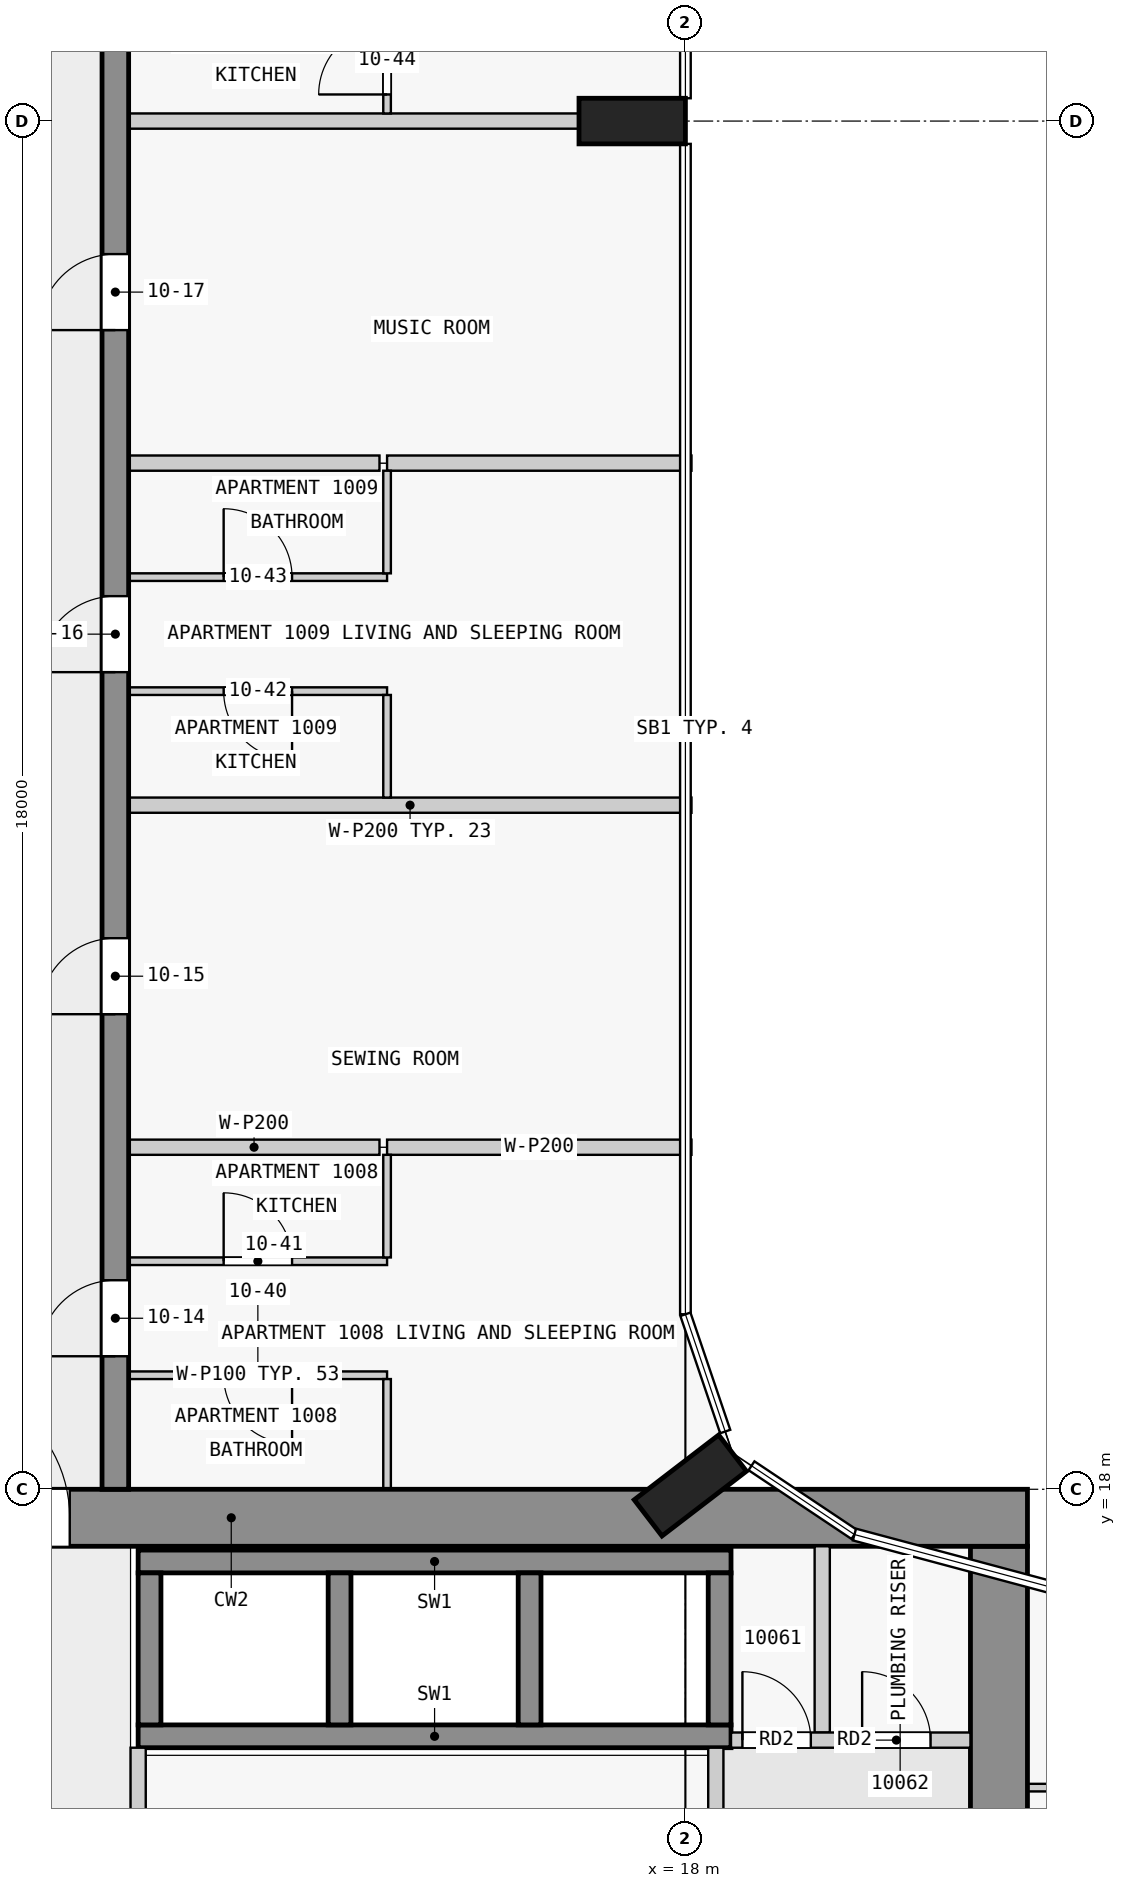
"""IFC4 building model, lengths in metres.
Left out: names, types, materials, properties, quantities, classifications, styles, units other than length and angle.
Written with IfcOpenShell. Run it as: python <this file> out.ifc"""

import sys

from ifc_helpers import new_model, si_unit, direction, frame, frame_2d, origin, origin_2d, place, context, subcontext, project, spatial, rectangle, extrude, element, fill, save


model = new_model("IFC4")
c1 = context("Model", 3, precision=1e-05, world=origin(), true_north=direction((0.0, 1.0)))
c2 = subcontext(c1, "Body", "Model", "MODEL_VIEW")
j1 = project(units=[si_unit("LENGTHUNIT", "METRE"), si_unit("PLANEANGLEUNIT", "RADIAN")], contexts=[c1])
p1 = place(None, origin())
s1 = spatial("IfcSite", under=j1, at=p1, CompositionType="ELEMENT")
p2 = place(p1, origin())
s2 = spatial("IfcBuilding", under=s1, at=p2, CompositionType="ELEMENT")
p3 = place(p2, frame((0.0, 0.0, 44.3)))
s3 = spatial("IfcBuildingStorey", under=s2, at=p3, CompositionType="ELEMENT", Elevation=44.3)
for number, where, z_axis, x_axis in (
    (1, (18.065, 18.05, 0.0), (0.0, 0.0, 1.0), (-0.609, 0.793, 0.0)),
    (2, (17.3, 36.0, 0.0), (0.0, 0.0, 1.0), (0.0, 1.0, 0.0)),
):
    element("IfcColumn", number, at=place(p3, frame(where, z_axis=z_axis, x_axis=x_axis)), inside=s3, PredefinedType="COLUMN", context=c2, shape_type="SweptSolid", body=[
        extrude(rectangle(XDim=0.6, YDim=1.4, at=origin_2d()), origin(), (0.0, 0.0, 1.0), 3.5),
    ])
p4 = place(p3, frame((1.55, 17.625, 0.0), z_axis=(0.0, 0.0, 1.0), x_axis=(1.0, 0.0, 0.0)))
e3 = element("IfcWall", 3, at=p4, inside=s3, PredefinedType="SHEAR", context=c2, shape_type="SweptSolid", body=[
    extrude(rectangle(XDim=20.95, YDim=0.75, at=frame_2d((10.475, 0.0))), origin(), (0.0, 0.0, 1.0), 3.25),
])
p5 = place(p4, frame((6.55, 0.0, 0.0)))
e4 = element("IfcOpeningElement", 4, at=p5, cuts=e3, PredefinedType="OPENING", context=c2, shape_type="SweptSolid", body=[
    extrude(rectangle(XDim=1.8, YDim=2.1, at=frame_2d((0.9, 1.05))), frame((0.0, 0.385, 0.0), z_axis=(0.0, -1.0, 0.0), x_axis=(1.0, 0.0, 0.0)), (0.0, 0.0, 1.0), 0.77),
])
p6 = place(p3, frame((22.125, 2.5, 0.0), z_axis=(0.0, 0.0, 1.0), x_axis=(0.0, 1.0, 0.0)))
e5 = element("IfcWall", 5, at=p6, inside=s3, PredefinedType="SHEAR", context=c2, shape_type="SweptSolid", body=[
    extrude(rectangle(XDim=14.75, YDim=0.75, at=frame_2d((7.375, 0.0))), origin(), (0.0, 0.0, 1.0), 3.25),
])
p7 = place(p6, frame((5.6, 0.0, 0.0)))
e6 = element("IfcOpeningElement", 6, at=p7, cuts=e5, PredefinedType="OPENING", context=c2, shape_type="SweptSolid", body=[
    extrude(rectangle(XDim=1.8, YDim=2.1, at=frame_2d((0.9, 1.05))), frame((0.0, 0.385, 0.0), z_axis=(0.0, -1.0, 0.0), x_axis=(1.0, 0.0, 0.0)), (0.0, 0.0, 1.0), 0.77),
])
for number, where, z_axis, x_axis in (
    (7, (10.8, 17.05, 0.0), (0.0, 0.0, 1.0), (1.0, 0.0, 0.0)),
    (8, (10.8, 14.75, 0.0), (0.0, 0.0, 1.0), (1.0, 0.0, 0.0)),
):
    element("IfcWall", number, at=place(p3, frame(where, z_axis=z_axis, x_axis=x_axis)), inside=s3, PredefinedType="SHEAR", context=c2, shape_type="SweptSolid", body=[
        extrude(rectangle(XDim=7.8, YDim=0.3, at=frame_2d((3.9, 0.0))), origin(), (0.0, 0.0, 1.0), 3.25),
    ])
for number, where, z_axis, x_axis in (
    (9, (10.95, 14.9, 0.0), (0.0, 0.0, 1.0), (0.0, 1.0, 0.0)),
    (10, (13.45, 14.9, 0.0), (0.0, 0.0, 1.0), (0.0, 1.0, 0.0)),
    (11, (15.95, 14.9, 0.0), (0.0, 0.0, 1.0), (0.0, 1.0, 0.0)),
    (12, (18.45, 14.9, 0.0), (0.0, 0.0, 1.0), (0.0, 1.0, 0.0)),
):
    element("IfcWall", number, at=place(p3, frame(where, z_axis=z_axis, x_axis=x_axis)), inside=s3, PredefinedType="SHEAR", context=c2, shape_type="SweptSolid", body=[
        extrude(rectangle(XDim=2.0, YDim=0.3, at=frame_2d((1.0, 0.0))), origin(), (0.0, 0.0, 1.0), 3.25),
    ])
p8 = place(p3, frame((10.5, 18.0, 0.0), z_axis=(0.0, 0.0, 1.0), x_axis=(0.0, 1.0, 0.0)))
e13 = element("IfcWall", 13, at=p8, inside=s3, PredefinedType="SHEAR", context=c2, shape_type="SweptSolid", body=[
    extrude(rectangle(XDim=27.0, YDim=0.35, at=frame_2d((13.5, 0.0))), origin(), (0.0, 0.0, 1.0), 3.25),
])
p9 = place(p8, frame((1.75, 0.0, 0.0)))
e14 = element("IfcOpeningElement", 14, at=p9, cuts=e13, PredefinedType="OPENING", context=c2, shape_type="SweptSolid", body=[
    extrude(rectangle(XDim=1.0, YDim=2.1, at=frame_2d((0.5, 1.05))), frame((0.0, 0.185, 0.0), z_axis=(0.0, -1.0, 0.0), x_axis=(1.0, 0.0, 0.0)), (0.0, 0.0, 1.0), 0.37),
])
p10 = place(p8, frame((6.25, 0.0, 0.0)))
e15 = element("IfcOpeningElement", 15, at=p10, cuts=e13, PredefinedType="OPENING", context=c2, shape_type="SweptSolid", body=[
    extrude(rectangle(XDim=1.0, YDim=2.1, at=frame_2d((0.5, 1.05))), frame((0.0, 0.185, 0.0), z_axis=(0.0, -1.0, 0.0), x_axis=(1.0, 0.0, 0.0)), (0.0, 0.0, 1.0), 0.37),
])
p11 = place(p8, frame((10.75, 0.0, 0.0)))
e16 = element("IfcOpeningElement", 16, at=p11, cuts=e13, PredefinedType="OPENING", context=c2, shape_type="SweptSolid", body=[
    extrude(rectangle(XDim=1.0, YDim=2.1, at=frame_2d((0.5, 1.05))), frame((0.0, 0.185, 0.0), z_axis=(0.0, -1.0, 0.0), x_axis=(1.0, 0.0, 0.0)), (0.0, 0.0, 1.0), 0.37),
])
p12 = place(p8, frame((15.25, 0.0, 0.0)))
e17 = element("IfcOpeningElement", 17, at=p12, cuts=e13, PredefinedType="OPENING", context=c2, shape_type="SweptSolid", body=[
    extrude(rectangle(XDim=1.0, YDim=2.1, at=frame_2d((0.5, 1.05))), frame((0.0, 0.185, 0.0), z_axis=(0.0, -1.0, 0.0), x_axis=(1.0, 0.0, 0.0)), (0.0, 0.0, 1.0), 0.37),
])
p13 = place(p8, frame((21.35, 0.0, 0.0)))
e18 = element("IfcOpeningElement", 18, at=p13, cuts=e13, PredefinedType="OPENING", context=c2, shape_type="SweptSolid", body=[
    extrude(rectangle(XDim=1.0, YDim=2.1, at=frame_2d((0.5, 1.05))), frame((0.0, 0.185, 0.0), z_axis=(0.0, -1.0, 0.0), x_axis=(1.0, 0.0, 0.0)), (0.0, 0.0, 1.0), 0.37),
])
p14 = place(p3, frame((10.8, 8.4, 0.0), z_axis=(0.0, 0.0, 1.0), x_axis=(0.0, 1.0, 0.0)))
e19 = element("IfcWall", 19, at=p14, inside=s3, PredefinedType="PARTITIONING", context=c2, shape_type="SweptSolid", body=[
    extrude(rectangle(XDim=6.2, YDim=0.2, at=frame_2d((3.1, 0.0))), origin(), (0.0, 0.0, 1.0), 3.25),
])
p15 = place(p3, frame((18.4, 8.4, 0.0), z_axis=(0.0, 0.0, 1.0), x_axis=(0.0, 1.0, 0.0)))
e20 = element("IfcWall", 20, at=p15, inside=s3, PredefinedType="PARTITIONING", context=c2, shape_type="SweptSolid", body=[
    extrude(rectangle(XDim=6.2, YDim=0.2, at=frame_2d((3.1, 0.0))), origin(), (0.0, 0.0, 1.0), 3.25),
])
p16 = place(p15, frame((3.15, 0.0, 0.0)))
e21 = element("IfcOpeningElement", 21, at=p16, cuts=e20, PredefinedType="OPENING", context=c2, shape_type="SweptSolid", body=[
    extrude(rectangle(XDim=0.9, YDim=2.1, at=frame_2d((0.45, 1.05))), frame((0.0, 0.11, 0.0), z_axis=(0.0, -1.0, 0.0), x_axis=(1.0, 0.0, 0.0)), (0.0, 0.0, 1.0), 0.22),
])
p17 = place(p3, frame((18.6, 14.7, 0.0), z_axis=(0.0, 0.0, 1.0), x_axis=(1.0, 0.0, 0.0)))
e22 = element("IfcWall", 22, at=p17, inside=s3, PredefinedType="PARTITIONING", context=c2, shape_type="SweptSolid", body=[
    extrude(rectangle(XDim=3.15, YDim=0.2, at=frame_2d((1.575, 0.0))), origin(), (0.0, 0.0, 1.0), 3.25),
])
p18 = place(p17, frame((0.15, 0.0, 0.0)))
e23 = element("IfcOpeningElement", 23, at=p18, cuts=e22, PredefinedType="OPENING", context=c2, shape_type="SweptSolid", body=[
    extrude(rectangle(XDim=0.9, YDim=2.1, at=frame_2d((0.45, 1.05))), frame((0.0, 0.11, 0.0), z_axis=(0.0, -1.0, 0.0), x_axis=(1.0, 0.0, 0.0)), (0.0, 0.0, 1.0), 0.22),
])
p19 = place(p17, frame((1.725, 0.0, 0.0)))
e24 = element("IfcOpeningElement", 24, at=p19, cuts=e22, PredefinedType="OPENING", context=c2, shape_type="SweptSolid", body=[
    extrude(rectangle(XDim=0.9, YDim=2.1, at=frame_2d((0.45, 1.05))), frame((0.0, 0.11, 0.0), z_axis=(0.0, -1.0, 0.0), x_axis=(1.0, 0.0, 0.0)), (0.0, 0.0, 1.0), 0.22),
])
p20 = place(p3, frame((19.8, 14.8, 0.0), z_axis=(0.0, 0.0, 1.0), x_axis=(0.0, 1.0, 0.0)))
e25 = element("IfcWall", 25, at=p20, inside=s3, PredefinedType="PARTITIONING", context=c2, shape_type="SweptSolid", body=[
    extrude(rectangle(XDim=2.45, YDim=0.2, at=frame_2d((1.225, 0.0))), origin(), (0.0, 0.0, 1.0), 3.25),
])
p21 = place(p3, frame((23.95, 14.075, 0.0), z_axis=(0.0, 0.0, 1.0), x_axis=(-1.0, 0.0, 0.0)))
e26 = element("IfcWall", 26, at=p21, inside=s3, PredefinedType="PARTITIONING", context=c2, shape_type="SweptSolid", body=[
    extrude(rectangle(XDim=1.45, YDim=0.1, at=frame_2d((0.725, 0.0))), origin(), (0.0, 0.0, 1.0), 3.25),
])
p22 = place(p3, frame((14.075, 19.5, 0.0), z_axis=(0.0, 0.0, 1.0), x_axis=(-1.0, 0.0, 0.0)))
e27 = element("IfcWall", 27, at=p22, inside=s3, PredefinedType="PARTITIONING", context=c2, shape_type="SweptSolid", body=[
    extrude(rectangle(XDim=3.4, YDim=0.1, at=frame_2d((1.7, 0.0))), origin(), (0.0, 0.0, 1.0), 3.25),
])
p23 = place(p22, frame((1.25, 0.0, 0.0)))
e28 = element("IfcOpeningElement", 28, at=p23, cuts=e27, PredefinedType="OPENING", context=c2, shape_type="SweptSolid", body=[
    extrude(rectangle(XDim=0.9, YDim=2.1, at=frame_2d((0.45, 1.05))), frame((0.0, 0.06, 0.0), z_axis=(0.0, -1.0, 0.0), x_axis=(1.0, 0.0, 0.0)), (0.0, 0.0, 1.0), 0.12),
])
p24 = place(p3, frame((10.675, 21.0, 0.0), z_axis=(0.0, 0.0, 1.0), x_axis=(1.0, 0.0, 0.0)))
e29 = element("IfcWall", 29, at=p24, inside=s3, PredefinedType="PARTITIONING", context=c2, shape_type="SweptSolid", body=[
    extrude(rectangle(XDim=3.4, YDim=0.1, at=frame_2d((1.7, 0.0))), origin(), (0.0, 0.0, 1.0), 3.25),
])
p25 = place(p24, frame((1.25, 0.0, 0.0)))
e30 = element("IfcOpeningElement", 30, at=p25, cuts=e29, PredefinedType="OPENING", context=c2, shape_type="SweptSolid", body=[
    extrude(rectangle(XDim=0.9, YDim=2.1, at=frame_2d((0.45, 1.05))), frame((0.0, 0.06, 0.0), z_axis=(0.0, -1.0, 0.0), x_axis=(1.0, 0.0, 0.0)), (0.0, 0.0, 1.0), 0.12),
])
p26 = place(p3, frame((13.975, 22.5, 0.0), z_axis=(0.0, 0.0, 1.0), x_axis=(-1.0, 0.0, 0.0)))
e31 = element("IfcWall", 31, at=p26, inside=s3, PredefinedType="PARTITIONING", context=c2, shape_type="SweptSolid", body=[
    extrude(rectangle(XDim=3.3, YDim=0.2, at=frame_2d((1.65, 0.0))), origin(), (0.0, 0.0, 1.0), 3.25),
])
p27 = place(p3, frame((14.075, 22.5, 0.0), z_axis=(0.0, 0.0, 1.0), x_axis=(1.0, 0.0, 0.0)))
e32 = element("IfcWall", 32, at=p27, inside=s3, PredefinedType="PARTITIONING", context=c2, shape_type="SweptSolid", body=[
    extrude(rectangle(XDim=4.005, YDim=0.2, at=frame_2d((2.002, 0.0))), origin(), (0.0, 0.0, 1.0), 3.25),
])
p28 = place(p3, frame((18.08, 27.0, 0.0), z_axis=(0.0, 0.0, 1.0), x_axis=(-1.0, 0.0, 0.0)))
e33 = element("IfcWall", 33, at=p28, inside=s3, PredefinedType="PARTITIONING", context=c2, shape_type="SweptSolid", body=[
    extrude(rectangle(XDim=7.405, YDim=0.2, at=frame_2d((3.703, 0.0))), origin(), (0.0, 0.0, 1.0), 3.25),
])
p29 = place(p3, frame((14.075, 28.5, 0.0), z_axis=(0.0, 0.0, 1.0), x_axis=(-1.0, 0.0, 0.0)))
e34 = element("IfcWall", 34, at=p29, inside=s3, PredefinedType="PARTITIONING", context=c2, shape_type="SweptSolid", body=[
    extrude(rectangle(XDim=3.4, YDim=0.1, at=frame_2d((1.7, 0.0))), origin(), (0.0, 0.0, 1.0), 3.25),
])
p30 = place(p29, frame((1.25, 0.0, 0.0)))
e35 = element("IfcOpeningElement", 35, at=p30, cuts=e34, PredefinedType="OPENING", context=c2, shape_type="SweptSolid", body=[
    extrude(rectangle(XDim=0.9, YDim=2.1, at=frame_2d((0.45, 1.05))), frame((0.0, 0.06, 0.0), z_axis=(0.0, -1.0, 0.0), x_axis=(1.0, 0.0, 0.0)), (0.0, 0.0, 1.0), 0.12),
])
p31 = place(p3, frame((10.675, 30.0, 0.0), z_axis=(0.0, 0.0, 1.0), x_axis=(1.0, 0.0, 0.0)))
e36 = element("IfcWall", 36, at=p31, inside=s3, PredefinedType="PARTITIONING", context=c2, shape_type="SweptSolid", body=[
    extrude(rectangle(XDim=3.4, YDim=0.1, at=frame_2d((1.7, 0.0))), origin(), (0.0, 0.0, 1.0), 3.25),
])
p32 = place(p31, frame((1.25, 0.0, 0.0)))
e37 = element("IfcOpeningElement", 37, at=p32, cuts=e36, PredefinedType="OPENING", context=c2, shape_type="SweptSolid", body=[
    extrude(rectangle(XDim=0.9, YDim=2.1, at=frame_2d((0.45, 1.05))), frame((0.0, 0.06, 0.0), z_axis=(0.0, -1.0, 0.0), x_axis=(1.0, 0.0, 0.0)), (0.0, 0.0, 1.0), 0.12),
])
p33 = place(p3, frame((13.975, 31.5, 0.0), z_axis=(0.0, 0.0, 1.0), x_axis=(-1.0, 0.0, 0.0)))
e38 = element("IfcWall", 38, at=p33, inside=s3, PredefinedType="PARTITIONING", context=c2, shape_type="SweptSolid", body=[
    extrude(rectangle(XDim=3.3, YDim=0.2, at=frame_2d((1.65, 0.0))), origin(), (0.0, 0.0, 1.0), 3.25),
])
p34 = place(p3, frame((14.075, 31.5, 0.0), z_axis=(0.0, 0.0, 1.0), x_axis=(1.0, 0.0, 0.0)))
e39 = element("IfcWall", 39, at=p34, inside=s3, PredefinedType="PARTITIONING", context=c2, shape_type="SweptSolid", body=[
    extrude(rectangle(XDim=4.005, YDim=0.2, at=frame_2d((2.002, 0.0))), origin(), (0.0, 0.0, 1.0), 3.25),
])
p35 = place(p3, frame((16.6, 36.0, 0.0), z_axis=(0.0, 0.0, 1.0), x_axis=(-1.0, 0.0, 0.0)))
e40 = element("IfcWall", 40, at=p35, inside=s3, PredefinedType="PARTITIONING", context=c2, shape_type="SweptSolid", body=[
    extrude(rectangle(XDim=5.925, YDim=0.2, at=frame_2d((2.962, 0.0))), origin(), (0.0, 0.0, 1.0), 3.25),
])
p36 = place(p3, frame((14.075, 18.0, 0.0), z_axis=(0.0, 0.0, 1.0), x_axis=(0.0, 1.0, 0.0)))
e41 = element("IfcWall", 41, at=p36, inside=s3, PredefinedType="PARTITIONING", context=c2, shape_type="SweptSolid", body=[
    extrude(rectangle(XDim=1.45, YDim=0.1, at=frame_2d((0.725, 0.0))), origin(), (0.0, 0.0, 1.0), 3.25),
])
for number, where, z_axis, x_axis in (
    (42, (14.075, 21.05, 0.0), (0.0, 0.0, 1.0), (0.0, 1.0, 0.0)),
    (43, (14.075, 27.1, 0.0), (0.0, 0.0, 1.0), (0.0, 1.0, 0.0)),
    (44, (14.075, 30.05, 0.0), (0.0, 0.0, 1.0), (0.0, 1.0, 0.0)),
):
    element("IfcWall", number, at=place(p3, frame(where, z_axis=z_axis, x_axis=x_axis)), inside=s3, PredefinedType="PARTITIONING", context=c2, shape_type="SweptSolid", body=[
        extrude(rectangle(XDim=1.35, YDim=0.1, at=frame_2d((0.675, 0.0))), origin(), (0.0, 0.0, 1.0), 3.25),
    ])
p37 = place(p3, frame((14.075, 36.1, 0.0), z_axis=(0.0, 0.0, 1.0), x_axis=(0.0, 1.0, 0.0)))
e45 = element("IfcWall", 45, at=p37, inside=s3, PredefinedType="PARTITIONING", context=c2, shape_type="SweptSolid", body=[
    extrude(rectangle(XDim=1.45, YDim=0.1, at=frame_2d((0.725, 0.0))), origin(), (0.0, 0.0, 1.0), 3.25),
])
p38 = place(p37, frame((0.25, 0.0, 0.0)))
e46 = element("IfcOpeningElement", 46, at=p38, cuts=e45, PredefinedType="OPENING", context=c2, shape_type="SweptSolid", body=[
    extrude(rectangle(XDim=0.9, YDim=2.1, at=frame_2d((0.45, 1.05))), frame((0.0, 0.06, 0.0), z_axis=(0.0, -1.0, 0.0), x_axis=(1.0, 0.0, 0.0)), (0.0, 0.0, 1.0), 0.12),
])
p39 = place(p5, origin())
e47 = element("IfcDoor", 47, at=p39, inside=s3, OperationType="DOUBLE_DOOR_SINGLE_SWING", PredefinedType="DOOR", context=c2, shape_type="SweptSolid", body=[
    extrude(rectangle(XDim=1.8, YDim=2.1, at=frame_2d((0.9, 1.05))), frame((0.0, 0.025, 0.0), z_axis=(0.0, -1.0, 0.0), x_axis=(1.0, 0.0, 0.0)), (0.0, 0.0, 1.0), 0.05),
])
fill(e4, e47)
p40 = place(p18, origin())
e48 = element("IfcDoor", 48, at=p40, inside=s3, OperationType="SINGLE_SWING_LEFT", PredefinedType="DOOR", context=c2, shape_type="SweptSolid", body=[
    extrude(rectangle(XDim=0.9, YDim=2.1, at=frame_2d((0.45, 1.05))), frame((0.0, 0.025, 0.0), z_axis=(0.0, -1.0, 0.0), x_axis=(1.0, 0.0, 0.0)), (0.0, 0.0, 1.0), 0.05),
])
fill(e23, e48)
p41 = place(p19, origin())
e49 = element("IfcDoor", 49, at=p41, inside=s3, OperationType="SINGLE_SWING_LEFT", PredefinedType="DOOR", context=c2, shape_type="SweptSolid", body=[
    extrude(rectangle(XDim=0.9, YDim=2.1, at=frame_2d((0.45, 1.05))), frame((0.0, 0.025, 0.0), z_axis=(0.0, -1.0, 0.0), x_axis=(1.0, 0.0, 0.0)), (0.0, 0.0, 1.0), 0.05),
])
fill(e24, e49)
p42 = place(p9, origin())
e50 = element("IfcDoor", 50, at=p42, inside=s3, OperationType="SINGLE_SWING_LEFT", PredefinedType="DOOR", context=c2, shape_type="SweptSolid", body=[
    extrude(rectangle(XDim=1.0, YDim=2.1, at=frame_2d((0.5, 1.05))), frame((0.0, 0.025, 0.0), z_axis=(0.0, -1.0, 0.0), x_axis=(1.0, 0.0, 0.0)), (0.0, 0.0, 1.0), 0.05),
])
fill(e14, e50)
p43 = place(p10, origin())
e51 = element("IfcDoor", 51, at=p43, inside=s3, OperationType="SINGLE_SWING_LEFT", PredefinedType="DOOR", context=c2, shape_type="SweptSolid", body=[
    extrude(rectangle(XDim=1.0, YDim=2.1, at=frame_2d((0.5, 1.05))), frame((0.0, 0.025, 0.0), z_axis=(0.0, -1.0, 0.0), x_axis=(1.0, 0.0, 0.0)), (0.0, 0.0, 1.0), 0.05),
])
fill(e15, e51)
p44 = place(p11, origin())
e52 = element("IfcDoor", 52, at=p44, inside=s3, OperationType="SINGLE_SWING_LEFT", PredefinedType="DOOR", context=c2, shape_type="SweptSolid", body=[
    extrude(rectangle(XDim=1.0, YDim=2.1, at=frame_2d((0.5, 1.05))), frame((0.0, 0.025, 0.0), z_axis=(0.0, -1.0, 0.0), x_axis=(1.0, 0.0, 0.0)), (0.0, 0.0, 1.0), 0.05),
])
fill(e16, e52)
p45 = place(p12, origin())
e53 = element("IfcDoor", 53, at=p45, inside=s3, OperationType="SINGLE_SWING_RIGHT", PredefinedType="DOOR", context=c2, shape_type="SweptSolid", body=[
    extrude(rectangle(XDim=1.0, YDim=2.1, at=frame_2d((0.5, 1.05))), frame((0.0, 0.025, 0.0), z_axis=(0.0, -1.0, 0.0), x_axis=(1.0, 0.0, 0.0)), (0.0, 0.0, 1.0), 0.05),
])
fill(e17, e53)
p46 = place(p23, origin())
e54 = element("IfcDoor", 54, at=p46, inside=s3, OperationType="SINGLE_SWING_RIGHT", PredefinedType="DOOR", context=c2, shape_type="SweptSolid", body=[
    extrude(rectangle(XDim=0.9, YDim=2.1, at=frame_2d((0.45, 1.05))), frame((0.0, 0.025, 0.0), z_axis=(0.0, -1.0, 0.0), x_axis=(1.0, 0.0, 0.0)), (0.0, 0.0, 1.0), 0.05),
])
fill(e28, e54)
p47 = place(p25, origin())
e55 = element("IfcDoor", 55, at=p47, inside=s3, OperationType="SINGLE_SWING_RIGHT", PredefinedType="DOOR", context=c2, shape_type="SweptSolid", body=[
    extrude(rectangle(XDim=0.9, YDim=2.1, at=frame_2d((0.45, 1.05))), frame((0.0, 0.025, 0.0), z_axis=(0.0, -1.0, 0.0), x_axis=(1.0, 0.0, 0.0)), (0.0, 0.0, 1.0), 0.05),
])
fill(e30, e55)
p48 = place(p30, origin())
e56 = element("IfcDoor", 56, at=p48, inside=s3, OperationType="SINGLE_SWING_RIGHT", PredefinedType="DOOR", context=c2, shape_type="SweptSolid", body=[
    extrude(rectangle(XDim=0.9, YDim=2.1, at=frame_2d((0.45, 1.05))), frame((0.0, 0.025, 0.0), z_axis=(0.0, -1.0, 0.0), x_axis=(1.0, 0.0, 0.0)), (0.0, 0.0, 1.0), 0.05),
])
fill(e35, e56)
p49 = place(p32, origin())
e57 = element("IfcDoor", 57, at=p49, inside=s3, OperationType="SINGLE_SWING_RIGHT", PredefinedType="DOOR", context=c2, shape_type="SweptSolid", body=[
    extrude(rectangle(XDim=0.9, YDim=2.1, at=frame_2d((0.45, 1.05))), frame((0.0, 0.025, 0.0), z_axis=(0.0, -1.0, 0.0), x_axis=(1.0, 0.0, 0.0)), (0.0, 0.0, 1.0), 0.05),
])
fill(e37, e57)
p50 = place(p38, origin())
e58 = element("IfcDoor", 58, at=p50, inside=s3, OperationType="SINGLE_SWING_LEFT", PredefinedType="DOOR", context=c2, shape_type="SweptSolid", body=[
    extrude(rectangle(XDim=0.9, YDim=2.1, at=frame_2d((0.45, 1.05))), frame((0.0, 0.025, 0.0), z_axis=(0.0, -1.0, 0.0), x_axis=(1.0, 0.0, 0.0)), (0.0, 0.0, 1.0), 0.05),
])
fill(e46, e58)
save(model, sys.argv[1])
